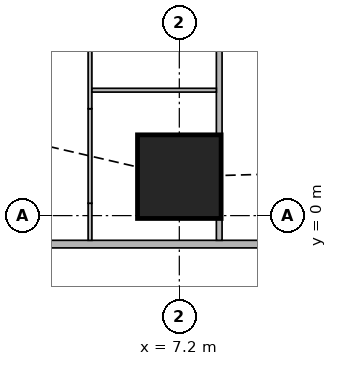
"""IFC4 building model, lengths in metres.
Left out: names, types, materials, properties, quantities, classifications, styles, units other than length and angle.
Written with IfcOpenShell. Run it as: python <this file> out.ifc"""

import sys

from ifc_helpers import new_model, si_unit, direction, frame, frame_2d, origin, origin_2d, place, context, subcontext, project, spatial, rectangle, extrude, element, fill, save


model = new_model("IFC4")
c1 = context("Model", 3, precision=1e-05, world=origin(), true_north=direction((0.0, 1.0)))
c2 = subcontext(c1, "Body", "Model", "MODEL_VIEW")
j1 = project(units=[si_unit("LENGTHUNIT", "METRE"), si_unit("PLANEANGLEUNIT", "RADIAN")], contexts=[c1])
p1 = place(None, origin())
s1 = spatial("IfcSite", under=j1, at=p1, CompositionType="ELEMENT")
p2 = place(p1, origin())
s2 = spatial("IfcBuilding", under=s1, at=p2, CompositionType="ELEMENT")
p3 = place(p2, frame((0.0, 0.0, 100.4)))
s3 = spatial("IfcBuildingStorey", under=s2, at=p3, CompositionType="ELEMENT", Elevation=100.4)
p4 = place(p3, frame((7.2, 1.025, 0.0), z_axis=(0.0, 0.0, 1.0), x_axis=(1.0, 0.0, 0.0)))
e1 = element("IfcColumn", 1, at=p4, inside=s3, PredefinedType="COLUMN", context=c2, shape_type="SweptSolid", body=[
    extrude(rectangle(XDim=2.2, YDim=2.2, at=origin_2d()), origin(), (0.0, 0.0, 1.0), 3.75),
])
p5 = place(p3, frame((2.163, -0.75, 0.0), z_axis=(0.0, 0.0, 1.0), x_axis=(1.0, 0.0, 0.0)))
e2 = element("IfcWall", 2, at=p5, inside=s3, PredefinedType="SOLIDWALL", context=c2, shape_type="SweptSolid", body=[
    extrude(rectangle(XDim=45.628, YDim=0.2, at=frame_2d((22.814, 0.0))), origin(), (0.0, 0.0, 1.0), 3.5),
])
p6 = place(p5, frame((9.537, 0.0, 0.9)))
e3 = element("IfcOpeningElement", 3, at=p6, cuts=e2, PredefinedType="OPENING", context=c2, shape_type="SweptSolid", body=[
    extrude(rectangle(XDim=1.8, YDim=1.5, at=frame_2d((0.9, 0.75))), frame((0.0, 0.11, 0.0), z_axis=(0.0, -1.0, 0.0), x_axis=(1.0, 0.0, 0.0)), (0.0, 0.0, 1.0), 0.22),
])
p7 = place(p5, frame((13.137, 0.0, 0.9)))
e4 = element("IfcOpeningElement", 4, at=p7, cuts=e2, PredefinedType="OPENING", context=c2, shape_type="SweptSolid", body=[
    extrude(rectangle(XDim=1.8, YDim=1.5, at=frame_2d((0.9, 0.75))), frame((0.0, 0.11, 0.0), z_axis=(0.0, -1.0, 0.0), x_axis=(1.0, 0.0, 0.0)), (0.0, 0.0, 1.0), 0.22),
])
p8 = place(p5, frame((16.737, 0.0, 0.9)))
e5 = element("IfcOpeningElement", 5, at=p8, cuts=e2, PredefinedType="OPENING", context=c2, shape_type="SweptSolid", body=[
    extrude(rectangle(XDim=1.8, YDim=1.5, at=frame_2d((0.9, 0.75))), frame((0.0, 0.11, 0.0), z_axis=(0.0, -1.0, 0.0), x_axis=(1.0, 0.0, 0.0)), (0.0, 0.0, 1.0), 0.22),
])
p9 = place(p5, frame((20.337, 0.0, 0.9)))
e6 = element("IfcOpeningElement", 6, at=p9, cuts=e2, PredefinedType="OPENING", context=c2, shape_type="SweptSolid", body=[
    extrude(rectangle(XDim=1.8, YDim=1.5, at=frame_2d((0.9, 0.75))), frame((0.0, 0.11, 0.0), z_axis=(0.0, -1.0, 0.0), x_axis=(1.0, 0.0, 0.0)), (0.0, 0.0, 1.0), 0.22),
])
p10 = place(p5, frame((23.937, 0.0, 0.9)))
e7 = element("IfcOpeningElement", 7, at=p10, cuts=e2, PredefinedType="OPENING", context=c2, shape_type="SweptSolid", body=[
    extrude(rectangle(XDim=1.8, YDim=1.5, at=frame_2d((0.9, 0.75))), frame((0.0, 0.11, 0.0), z_axis=(0.0, -1.0, 0.0), x_axis=(1.0, 0.0, 0.0)), (0.0, 0.0, 1.0), 0.22),
])
p11 = place(p5, frame((27.537, 0.0, 0.9)))
e8 = element("IfcOpeningElement", 8, at=p11, cuts=e2, PredefinedType="OPENING", context=c2, shape_type="SweptSolid", body=[
    extrude(rectangle(XDim=1.8, YDim=1.5, at=frame_2d((0.9, 0.75))), frame((0.0, 0.11, 0.0), z_axis=(0.0, -1.0, 0.0), x_axis=(1.0, 0.0, 0.0)), (0.0, 0.0, 1.0), 0.22),
])
p12 = place(p5, frame((31.137, 0.0, 0.9)))
e9 = element("IfcOpeningElement", 9, at=p12, cuts=e2, PredefinedType="OPENING", context=c2, shape_type="SweptSolid", body=[
    extrude(rectangle(XDim=1.8, YDim=1.5, at=frame_2d((0.9, 0.75))), frame((0.0, 0.11, 0.0), z_axis=(0.0, -1.0, 0.0), x_axis=(1.0, 0.0, 0.0)), (0.0, 0.0, 1.0), 0.22),
])
p13 = place(p5, frame((34.737, 0.0, 0.9)))
e10 = element("IfcOpeningElement", 10, at=p13, cuts=e2, PredefinedType="OPENING", context=c2, shape_type="SweptSolid", body=[
    extrude(rectangle(XDim=1.8, YDim=1.5, at=frame_2d((0.9, 0.75))), frame((0.0, 0.11, 0.0), z_axis=(0.0, -1.0, 0.0), x_axis=(1.0, 0.0, 0.0)), (0.0, 0.0, 1.0), 0.22),
])
p14 = place(p3, frame((8.25, -0.65, 0.0), z_axis=(0.0, 0.0, 1.0), x_axis=(0.0, 1.0, 0.0)))
e11 = element("IfcWall", 11, at=p14, inside=s3, PredefinedType="SOLIDWALL", context=c2, shape_type="SweptSolid", body=[
    extrude(rectangle(XDim=0.574, YDim=0.15, at=frame_2d((0.287, 0.0))), origin(), (0.0, 0.0, 1.0), 3.5),
])
p15 = place(p3, frame((8.25, 2.126, 0.0), z_axis=(0.0, 0.0, 1.0), x_axis=(0.0, 1.0, 0.0)))
e12 = element("IfcWall", 12, at=p15, inside=s3, PredefinedType="SOLIDWALL", context=c2, shape_type="SweptSolid", body=[
    extrude(rectangle(XDim=40.773, YDim=0.15, at=frame_2d((20.386, 0.0))), origin(), (0.0, 0.0, 1.0), 3.5),
])
p16 = place(p15, frame((10.286, 0.0, 0.0)))
e13 = element("IfcOpeningElement", 13, at=p16, cuts=e12, PredefinedType="OPENING", context=c2, shape_type="SweptSolid", body=[
    extrude(rectangle(XDim=1.0, YDim=2.1, at=frame_2d((0.5, 1.05))), frame((0.0, 0.085, 0.0), z_axis=(0.0, -1.0, 0.0), x_axis=(1.0, 0.0, 0.0)), (0.0, 0.0, 1.0), 0.17),
])
p17 = place(p15, frame((14.461, 0.0, 0.0)))
e14 = element("IfcOpeningElement", 14, at=p17, cuts=e12, PredefinedType="OPENING", context=c2, shape_type="SweptSolid", body=[
    extrude(rectangle(XDim=1.0, YDim=2.1, at=frame_2d((0.5, 1.05))), frame((0.0, 0.085, 0.0), z_axis=(0.0, -1.0, 0.0), x_axis=(1.0, 0.0, 0.0)), (0.0, 0.0, 1.0), 0.17),
])
p18 = place(p15, frame((25.287, 0.0, 0.0)))
e15 = element("IfcOpeningElement", 15, at=p18, cuts=e12, PredefinedType="OPENING", context=c2, shape_type="SweptSolid", body=[
    extrude(rectangle(XDim=1.0, YDim=2.1, at=frame_2d((0.5, 1.05))), frame((0.0, 0.085, 0.0), z_axis=(0.0, -1.0, 0.0), x_axis=(1.0, 0.0, 0.0)), (0.0, 0.0, 1.0), 0.17),
])
p19 = place(p15, frame((32.787, 0.0, 0.0)))
e16 = element("IfcOpeningElement", 16, at=p19, cuts=e12, PredefinedType="OPENING", context=c2, shape_type="SweptSolid", body=[
    extrude(rectangle(XDim=1.0, YDim=2.1, at=frame_2d((0.5, 1.05))), frame((0.0, 0.085, 0.0), z_axis=(0.0, -1.0, 0.0), x_axis=(1.0, 0.0, 0.0)), (0.0, 0.0, 1.0), 0.17),
])
p20 = place(p3, frame((4.85, -0.65, 0.0), z_axis=(0.0, 0.0, 1.0), x_axis=(0.0, 1.0, 0.0)))
e17 = element("IfcWall", 17, at=p20, inside=s3, PredefinedType="PARTITIONING", context=c2, shape_type="SweptSolid", body=[
    extrude(rectangle(XDim=0.976, YDim=0.1, at=frame_2d((0.488, 0.0))), origin(), (0.0, 0.0, 1.0), 3.5),
])
p21 = place(p3, frame((4.85, 0.326, 0.0), z_axis=(0.0, 0.0, 1.0), x_axis=(0.0, 1.0, 0.0)))
e18 = element("IfcWall", 18, at=p21, inside=s3, PredefinedType="PARTITIONING", context=c2, shape_type="SweptSolid", body=[
    extrude(rectangle(XDim=2.486, YDim=0.1, at=frame_2d((1.243, 0.0))), origin(), (0.0, 0.0, 1.0), 2.05),
])
p22 = place(p3, frame((4.85, 2.812, 0.0), z_axis=(0.0, 0.0, 1.0), x_axis=(0.0, 1.0, 0.0)))
e19 = element("IfcWall", 19, at=p22, inside=s3, PredefinedType="PARTITIONING", context=c2, shape_type="SweptSolid", body=[
    extrude(rectangle(XDim=8.438, YDim=0.1, at=frame_2d((4.219, 0.0))), origin(), (0.0, 0.0, 1.0), 3.5),
])
p23 = place(p22, frame((6.883, 0.0, 0.0)))
e20 = element("IfcOpeningElement", 20, at=p23, cuts=e19, PredefinedType="OPENING", context=c2, shape_type="SweptSolid", body=[
    extrude(rectangle(XDim=0.9, YDim=2.1, at=frame_2d((0.45, 1.05))), frame((0.0, 0.06, 0.0), z_axis=(0.0, -1.0, 0.0), x_axis=(1.0, 0.0, 0.0)), (0.0, 0.0, 1.0), 0.12),
])
p24 = place(p22, frame((3.438, 0.0, 0.0)))
e21 = element("IfcOpeningElement", 21, at=p24, cuts=e19, PredefinedType="OPENING", context=c2, shape_type="SweptSolid", body=[
    extrude(rectangle(XDim=0.9, YDim=2.1, at=frame_2d((0.45, 1.05))), frame((0.0, 0.06, 0.0), z_axis=(0.0, -1.0, 0.0), x_axis=(1.0, 0.0, 0.0)), (0.0, 0.0, 1.0), 0.12),
])
p25 = place(p22, frame((5.008, 0.0, 0.0)))
e22 = element("IfcOpeningElement", 22, at=p25, cuts=e19, PredefinedType="OPENING", context=c2, shape_type="SweptSolid", body=[
    extrude(rectangle(XDim=0.9, YDim=2.1, at=frame_2d((0.45, 1.05))), frame((0.0, 0.06, 0.0), z_axis=(0.0, -1.0, 0.0), x_axis=(1.0, 0.0, 0.0)), (0.0, 0.0, 1.0), 0.12),
])
p26 = place(p22, frame((1.563, 0.0, 0.0)))
e23 = element("IfcOpeningElement", 23, at=p26, cuts=e19, PredefinedType="OPENING", context=c2, shape_type="SweptSolid", body=[
    extrude(rectangle(XDim=0.9, YDim=2.1, at=frame_2d((0.45, 1.05))), frame((0.0, 0.06, 0.0), z_axis=(0.0, -1.0, 0.0), x_axis=(1.0, 0.0, 0.0)), (0.0, 0.0, 1.0), 0.12),
])
p27 = place(p3, frame((8.175, 3.3, 0.0), z_axis=(0.0, 0.0, 1.0), x_axis=(-1.0, 0.0, 0.0)))
e24 = element("IfcWall", 24, at=p27, inside=s3, PredefinedType="PARTITIONING", context=c2, shape_type="SweptSolid", body=[
    extrude(rectangle(XDim=3.275, YDim=0.1, at=frame_2d((1.638, 0.0))), origin(), (0.0, 0.0, 1.0), 3.5),
])
p28 = place(p27, frame((2.1, 0.0, 0.0)))
e25 = element("IfcOpeningElement", 25, at=p28, cuts=e24, PredefinedType="OPENING", context=c2, shape_type="SweptSolid", body=[
    extrude(rectangle(XDim=0.9, YDim=2.1, at=frame_2d((0.45, 1.05))), frame((0.0, 0.06, 0.0), z_axis=(0.0, -1.0, 0.0), x_axis=(1.0, 0.0, 0.0)), (0.0, 0.0, 1.0), 0.12),
])
p29 = place(p28, origin())
e26 = element("IfcDoor", 26, at=p29, inside=s3, OperationType="SINGLE_SWING_LEFT", PredefinedType="DOOR", context=c2, shape_type="SweptSolid", body=[
    extrude(rectangle(XDim=0.9, YDim=2.1, at=frame_2d((0.45, 1.05))), frame((0.0, 0.025, 0.0), z_axis=(0.0, -1.0, 0.0), x_axis=(1.0, 0.0, 0.0)), (0.0, 0.0, 1.0), 0.05),
])
fill(e25, e26)
save(model, sys.argv[1])
